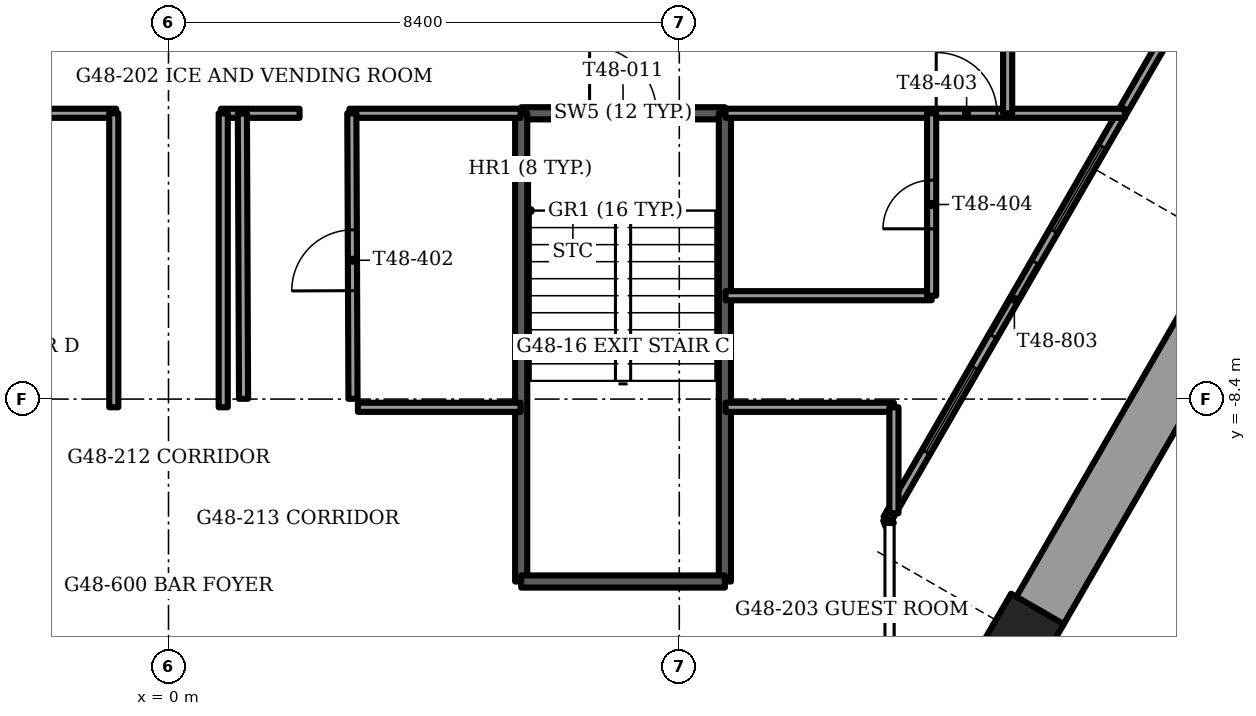
"""IFC4 building model, lengths in metres.
Left out: names, types, materials, properties, quantities, classifications, styles, units other than length and angle.
Written with IfcOpenShell. Run it as: python <this file> out.ifc"""

import sys

from ifc_helpers import new_model, si_unit, direction, frame, frame_2d, origin, origin_2d, place, context, subcontext, project, spatial, rectangle, extrude, element, fill, save


model = new_model("IFC4")
c1 = context("Model", 3, precision=1e-05, world=origin(), true_north=direction((0.0, 1.0)))
c2 = subcontext(c1, "Body", "Model", "MODEL_VIEW")
j1 = project(units=[si_unit("LENGTHUNIT", "METRE"), si_unit("PLANEANGLEUNIT", "RADIAN")], contexts=[c1])
p1 = place(None, origin())
s1 = spatial("IfcSite", under=j1, at=p1, CompositionType="ELEMENT")
p2 = place(p1, origin())
s2 = spatial("IfcBuilding", under=s1, at=p2, CompositionType="ELEMENT")
p3 = place(p2, frame((0.0, 0.0, 194.5)))
s3 = spatial("IfcBuildingStorey", under=s2, at=p3, CompositionType="ELEMENT", Elevation=194.5)
p4 = place(p3, frame((14.039, -12.283, -1.2), z_axis=(0.0, 0.0, 1.0), x_axis=(-0.5, -0.866025403784, 0.0)))
e1 = element("IfcColumn", 1, at=p4, inside=s3, PredefinedType="COLUMN", context=c2, shape_type="SweptSolid", body=[
    extrude(rectangle(XDim=1.0, YDim=1.0, at=origin_2d()), origin(), (0.0, 0.0, 1.0), 3.75),
])
p5 = place(p3, frame((14.317, -11.901, 0.0), z_axis=(0.0, 0.0, 1.0), x_axis=(0.500013351051, 0.866017695414, 0.0)))
e2 = element("IfcWall", 2, at=p5, inside=s3, PredefinedType="PARAPET", context=c2, shape_type="SweptSolid", body=[
    extrude(rectangle(XDim=6.296, YDim=0.9, at=frame_2d((3.148, 0.0))), origin(), (0.0, 0.0, 1.0), 1.1),
])
p6 = place(p3, frame((11.824, -10.37, 0.0), z_axis=(0.0, 0.0, 1.0), x_axis=(0.499996992154, 0.866027140358, 0.0)))
e3 = element("IfcWall", 3, at=p6, inside=s3, PredefinedType="SOLIDWALL", context=c2, shape_type="SweptSolid", body=[
    extrude(rectangle(XDim=10.264, YDim=0.15, at=frame_2d((5.132, 0.0))), origin(), (0.0, 0.0, 1.0), 3.45),
])
p7 = place(p6, frame((1.269, 0.0, 0.15)))
e4 = element("IfcOpeningElement", 4, at=p7, cuts=e3, PredefinedType="OPENING", context=c2, shape_type="SweptSolid", body=[
    extrude(rectangle(XDim=1.6, YDim=2.2, at=frame_2d((0.8, 1.1))), frame((0.0, 0.075, 0.0), z_axis=(0.0, -1.0, 0.0), x_axis=(1.0, 0.0, 0.0)), (0.0, 0.0, 1.0), 0.15),
])
p8 = place(p6, frame((3.469, 0.0, 0.0)))
e5 = element("IfcOpeningElement", 5, at=p8, cuts=e3, PredefinedType="OPENING", context=c2, shape_type="SweptSolid", body=[
    extrude(rectangle(XDim=1.4, YDim=2.4, at=frame_2d((0.7, 1.2))), frame((0.0, 0.075, 0.0), z_axis=(0.0, -1.0, 0.0), x_axis=(1.0, 0.0, 0.0)), (0.0, 0.0, 1.0), 0.15),
])
p9 = place(p6, frame((5.469, 0.0, 0.15)))
e6 = element("IfcOpeningElement", 6, at=p9, cuts=e3, PredefinedType="OPENING", context=c2, shape_type="SweptSolid", body=[
    extrude(rectangle(XDim=1.6, YDim=2.2, at=frame_2d((0.8, 1.1))), frame((0.0, 0.075, 0.0), z_axis=(0.0, -1.0, 0.0), x_axis=(1.0, 0.0, 0.0)), (0.0, 0.0, 1.0), 0.15),
])
p10 = place(p3, frame((11.824, -10.37, 0.0), z_axis=(0.0, 0.0, 1.0), x_axis=(0.338543167143, -0.940950861619, 0.0)))
e7 = element("IfcWall", 7, at=p10, inside=s3, PredefinedType="SOLIDWALL", context=c2, shape_type="SweptSolid", body=[
    extrude(rectangle(XDim=0.098, YDim=0.15, at=frame_2d((0.049, 0.0))), origin(), (0.0, 0.0, 1.0), 3.45),
])
p11 = place(p3, frame((5.8, -3.7, -0.3), z_axis=(0.0, 0.0, 1.0), x_axis=(1.0, 0.0, 0.0)))
e8 = element("IfcWall", 8, at=p11, inside=s3, PredefinedType="SOLIDWALL", context=c2, shape_type="SweptSolid", body=[
    extrude(rectangle(XDim=3.35, YDim=0.2, at=frame_2d((1.675, 0.0))), origin(), (0.0, 0.0, 1.0), 3.75),
])
p12 = place(p11, frame((1.125, 0.0, 0.0)))
e9 = element("IfcOpeningElement", 9, at=p12, cuts=e8, PredefinedType="OPENING", context=c2, shape_type="SweptSolid", body=[
    extrude(rectangle(XDim=1.1, YDim=2.1, at=frame_2d((0.55, 1.05))), frame((0.0, 0.1, 0.0), z_axis=(0.0, -1.0, 0.0), x_axis=(1.0, 0.0, 0.0)), (0.0, 0.0, 1.0), 0.2),
])
for number, where, z_axis, x_axis in (
    (10, (5.8, -3.7, -0.3), (0.0, 0.0, 1.0), (0.0, -1.0, 0.0)),
    (11, (9.15, -3.7, -0.3), (0.0, 0.0, 1.0), (0.0, -1.0, 0.0)),
):
    element("IfcWall", number, at=place(p3, frame(where, z_axis=z_axis, x_axis=x_axis)), inside=s3, PredefinedType="SOLIDWALL", context=c2, shape_type="SweptSolid", body=[
        extrude(rectangle(XDim=7.7, YDim=0.2, at=frame_2d((3.85, 0.0))), origin(), (0.0, 0.0, 1.0), 3.75),
    ])
p13 = place(p3, frame((5.8, -11.4, -0.3), z_axis=(0.0, 0.0, 1.0), x_axis=(1.0, 0.0, 0.0)))
e12 = element("IfcWall", 12, at=p13, inside=s3, PredefinedType="SOLIDWALL", context=c2, shape_type="SweptSolid", body=[
    extrude(rectangle(XDim=3.35, YDim=0.2, at=frame_2d((1.675, 0.0))), origin(), (0.0, 0.0, 1.0), 3.75),
])
p14 = place(p3, frame((3.115, -8.535, 0.0), z_axis=(0.0, 0.0, 1.0), x_axis=(1.0, 0.0, 0.0)))
e13 = element("IfcWall", 13, at=p14, inside=s3, PredefinedType="PARTITIONING", context=c2, shape_type="SweptSolid", body=[
    extrude(rectangle(XDim=2.675, YDim=0.15, at=frame_2d((1.337, 0.0))), origin(), (0.0, 0.0, 1.0), 3.45),
])
p15 = place(p3, frame((9.16, -8.535, 0.0), z_axis=(0.0, 0.0, 1.0), x_axis=(1.0, 0.0, 0.0)))
e14 = element("IfcWall", 14, at=p15, inside=s3, PredefinedType="PARTITIONING", context=c2, shape_type="SweptSolid", body=[
    extrude(rectangle(XDim=2.77, YDim=0.15, at=frame_2d((1.385, 0.0))), origin(), (0.0, 0.0, 1.0), 3.45),
])
p16 = place(p3, frame((9.16, -6.7, 0.0), z_axis=(0.0, 0.0, 1.0), x_axis=(1.0, 0.0, 0.0)))
e15 = element("IfcWall", 15, at=p16, inside=s3, PredefinedType="PARTITIONING", context=c2, shape_type="SweptSolid", body=[
    extrude(rectangle(XDim=3.39, YDim=0.15, at=frame_2d((1.695, 0.0))), origin(), (0.0, 0.0, 1.0), 3.45),
])
p17 = place(p3, frame((-5.79, -3.7, 0.0), z_axis=(0.0, 0.0, 1.0), x_axis=(1.0, 0.0, 0.0)))
e16 = element("IfcWall", 16, at=p17, inside=s3, PredefinedType="PARTITIONING", context=c2, shape_type="SweptSolid", body=[
    extrude(rectangle(XDim=4.93, YDim=0.15, at=frame_2d((2.465, 0.0))), origin(), (0.0, 0.0, 1.0), 3.45),
])
p18 = place(p3, frame((0.86, -3.7, 0.0), z_axis=(0.0, 0.0, 1.0), x_axis=(1.0, 0.0, 0.0)))
e17 = element("IfcWall", 17, at=p18, inside=s3, PredefinedType="PARTITIONING", context=c2, shape_type="SweptSolid", body=[
    extrude(rectangle(XDim=1.295, YDim=0.15, at=frame_2d((0.647, 0.0))), origin(), (0.0, 0.0, 1.0), 3.45),
])
p19 = place(p3, frame((2.975, -3.7, 0.0), z_axis=(0.0, 0.0, 1.0), x_axis=(1.0, 0.0, 0.0)))
e18 = element("IfcWall", 18, at=p19, inside=s3, PredefinedType="PARTITIONING", context=c2, shape_type="SweptSolid", body=[
    extrude(rectangle(XDim=2.815, YDim=0.15, at=frame_2d((1.407, 0.0))), origin(), (0.0, 0.0, 1.0), 3.45),
])
p20 = place(p3, frame((9.16, -3.7, 0.0), z_axis=(0.0, 0.0, 1.0), x_axis=(1.0, 0.0, 0.0)))
e19 = element("IfcWall", 19, at=p20, inside=s3, PredefinedType="PARTITIONING", context=c2, shape_type="SweptSolid", body=[
    extrude(rectangle(XDim=6.567, YDim=0.15, at=frame_2d((3.284, 0.0))), origin(), (0.0, 0.0, 1.0), 3.45),
])
p21 = place(p20, frame((3.465, 0.0, 0.0)))
e20 = element("IfcOpeningElement", 20, at=p21, cuts=e19, PredefinedType="OPENING", context=c2, shape_type="SweptSolid", body=[
    extrude(rectangle(XDim=1.0, YDim=2.1, at=frame_2d((0.5, 1.05))), frame((0.0, 0.075, 0.0), z_axis=(0.0, -1.0, 0.0), x_axis=(1.0, 0.0, 0.0)), (0.0, 0.0, 1.0), 0.15),
])
p22 = place(p3, frame((13.8, -3.7, 0.0), z_axis=(0.0, 0.0, 1.0), x_axis=(0.0, 1.0, 0.0)))
e21 = element("IfcWall", 21, at=p22, inside=s3, PredefinedType="PARTITIONING", context=c2, shape_type="SweptSolid", body=[
    extrude(rectangle(XDim=2.0, YDim=0.15, at=frame_2d((1.0, 0.0))), origin(), (0.0, 0.0, 1.0), 3.45),
])
p23 = place(p3, frame((12.55, -6.7, 0.0), z_axis=(0.0, 0.0, 1.0), x_axis=(0.0, 1.0, 0.0)))
e22 = element("IfcWall", 22, at=p23, inside=s3, PredefinedType="PARTITIONING", context=c2, shape_type="SweptSolid", body=[
    extrude(rectangle(XDim=3.0, YDim=0.15, at=frame_2d((1.5, 0.0))), origin(), (0.0, 0.0, 1.0), 3.45),
])
p24 = place(p23, frame((1.1, 0.0, 0.0)))
e23 = element("IfcOpeningElement", 23, at=p24, cuts=e22, PredefinedType="OPENING", context=c2, shape_type="SweptSolid", body=[
    extrude(rectangle(XDim=0.8, YDim=2.1, at=frame_2d((0.4, 1.05))), frame((0.0, 0.075, 0.0), z_axis=(0.0, -1.0, 0.0), x_axis=(1.0, 0.0, 0.0)), (0.0, 0.0, 1.0), 0.15),
])
p25 = place(p3, frame((11.93, -10.277, 0.0), z_axis=(0.0, 0.0, 1.0), x_axis=(0.0, 1.0, 0.0)))
e24 = element("IfcWall", 24, at=p25, inside=s3, PredefinedType="PARTITIONING", context=c2, shape_type="SweptSolid", body=[
    extrude(rectangle(XDim=1.742, YDim=0.15, at=frame_2d((0.871, 0.0))), origin(), (0.0, 0.0, 1.0), 3.45),
])
for number, where, z_axis, x_axis in (
    (25, (0.9, -8.535, 0.0), (0.0, 0.0, 1.0), (0.0, 1.0, 0.0)),
    (26, (-0.9, -8.535, 0.0), (0.0, 0.0, 1.0), (0.0, 1.0, 0.0)),
):
    element("IfcWall", number, at=place(p3, frame(where, z_axis=z_axis, x_axis=x_axis)), inside=s3, PredefinedType="PARTITIONING", context=c2, shape_type="SweptSolid", body=[
        extrude(rectangle(XDim=4.835, YDim=0.15, at=frame_2d((2.417, 0.0))), origin(), (0.0, 0.0, 1.0), 3.45),
    ])
p26 = place(p3, frame((3.034, -8.395, 0.0), z_axis=(0.0, 0.0, 1.0), x_axis=(-0.004055917967, 0.999991774731, 0.0)))
e27 = element("IfcWall", 27, at=p26, inside=s3, PredefinedType="PARTITIONING", context=c2, shape_type="SweptSolid", body=[
    extrude(rectangle(XDim=4.695, YDim=0.15, at=frame_2d((2.348, 0.0))), origin(), (0.0, 0.0, 1.0), 3.45),
])
p27 = place(p26, frame((1.778, 0.0, 0.0)))
e28 = element("IfcOpeningElement", 28, at=p27, cuts=e27, PredefinedType="OPENING", context=c2, shape_type="SweptSolid", body=[
    extrude(rectangle(XDim=1.0, YDim=2.1, at=frame_2d((0.5, 1.05))), frame((0.0, 0.075, 0.0), z_axis=(0.0, -1.0, 0.0), x_axis=(1.0, 0.0, 0.0)), (0.0, 0.0, 1.0), 0.15),
])
p28 = place(p3, frame((1.234, -8.395, 0.0), z_axis=(0.0, 0.0, 1.0), x_axis=(-0.004008296795, 0.999991966746, 0.0)))
e29 = element("IfcWall", 29, at=p28, inside=s3, PredefinedType="PARTITIONING", context=c2, shape_type="SweptSolid", body=[
    extrude(rectangle(XDim=4.69, YDim=0.15, at=frame_2d((2.345, 0.0))), origin(), (0.0, 0.0, 1.0), 3.45),
])
p29 = place(p7, origin())
e30 = element("IfcWindow", 30, at=p29, inside=s3, PartitioningType="SINGLE_PANEL", PredefinedType="WINDOW", context=c2, shape_type="SweptSolid", body=[
    extrude(rectangle(XDim=1.6, YDim=2.2, at=frame_2d((0.8, 1.1))), frame((0.0, 0.03, 0.0), z_axis=(0.0, -1.0, 0.0), x_axis=(1.0, 0.0, 0.0)), (0.0, 0.0, 1.0), 0.06),
])
fill(e4, e30)
p30 = place(p8, origin())
e31 = element("IfcDoor", 31, at=p30, inside=s3, OperationType="SLIDING_TO_RIGHT", PredefinedType="DOOR", context=c2, shape_type="SweptSolid", body=[
    extrude(rectangle(XDim=1.4, YDim=2.4, at=frame_2d((0.7, 1.2))), frame((0.0, 0.025, 0.0), z_axis=(0.0, -1.0, 0.0), x_axis=(1.0, 0.0, 0.0)), (0.0, 0.0, 1.0), 0.05),
])
fill(e5, e31)
p31 = place(p9, origin())
e32 = element("IfcWindow", 32, at=p31, inside=s3, PartitioningType="SINGLE_PANEL", PredefinedType="WINDOW", context=c2, shape_type="SweptSolid", body=[
    extrude(rectangle(XDim=1.6, YDim=2.2, at=frame_2d((0.8, 1.1))), frame((0.0, 0.03, 0.0), z_axis=(0.0, -1.0, 0.0), x_axis=(1.0, 0.0, 0.0)), (0.0, 0.0, 1.0), 0.06),
])
fill(e6, e32)
p32 = place(p12, origin())
e33 = element("IfcDoor", 33, at=p32, inside=s3, OperationType="SINGLE_SWING_LEFT", PredefinedType="DOOR", context=c2, shape_type="SweptSolid", body=[
    extrude(rectangle(XDim=1.1, YDim=2.1, at=frame_2d((0.55, 1.05))), frame((0.0, 0.025, 0.0), z_axis=(0.0, -1.0, 0.0), x_axis=(1.0, 0.0, 0.0)), (0.0, 0.0, 1.0), 0.05),
])
fill(e9, e33)
p33 = place(p27, origin())
e34 = element("IfcDoor", 34, at=p33, inside=s3, OperationType="SINGLE_SWING_RIGHT", PredefinedType="DOOR", context=c2, shape_type="SweptSolid", body=[
    extrude(rectangle(XDim=1.0, YDim=2.1, at=frame_2d((0.5, 1.05))), frame((0.0, 0.025, 0.0), z_axis=(0.0, -1.0, 0.0), x_axis=(1.0, 0.0, 0.0)), (0.0, 0.0, 1.0), 0.05),
])
fill(e28, e34)
p34 = place(p21, origin())
e35 = element("IfcDoor", 35, at=p34, inside=s3, OperationType="SINGLE_SWING_RIGHT", PredefinedType="DOOR", context=c2, shape_type="SweptSolid", body=[
    extrude(rectangle(XDim=1.0, YDim=2.1, at=frame_2d((0.5, 1.05))), frame((0.0, 0.025, 0.0), z_axis=(0.0, -1.0, 0.0), x_axis=(1.0, 0.0, 0.0)), (0.0, 0.0, 1.0), 0.05),
])
fill(e20, e35)
p35 = place(p24, origin())
e36 = element("IfcDoor", 36, at=p35, inside=s3, OperationType="SINGLE_SWING_RIGHT", PredefinedType="DOOR", context=c2, shape_type="SweptSolid", body=[
    extrude(rectangle(XDim=0.8, YDim=2.1, at=frame_2d((0.4, 1.05))), frame((0.0, 0.025, 0.0), z_axis=(0.0, -1.0, 0.0), x_axis=(1.0, 0.0, 0.0)), (0.0, 0.0, 1.0), 0.05),
])
fill(e23, e36)
save(model, sys.argv[1])
